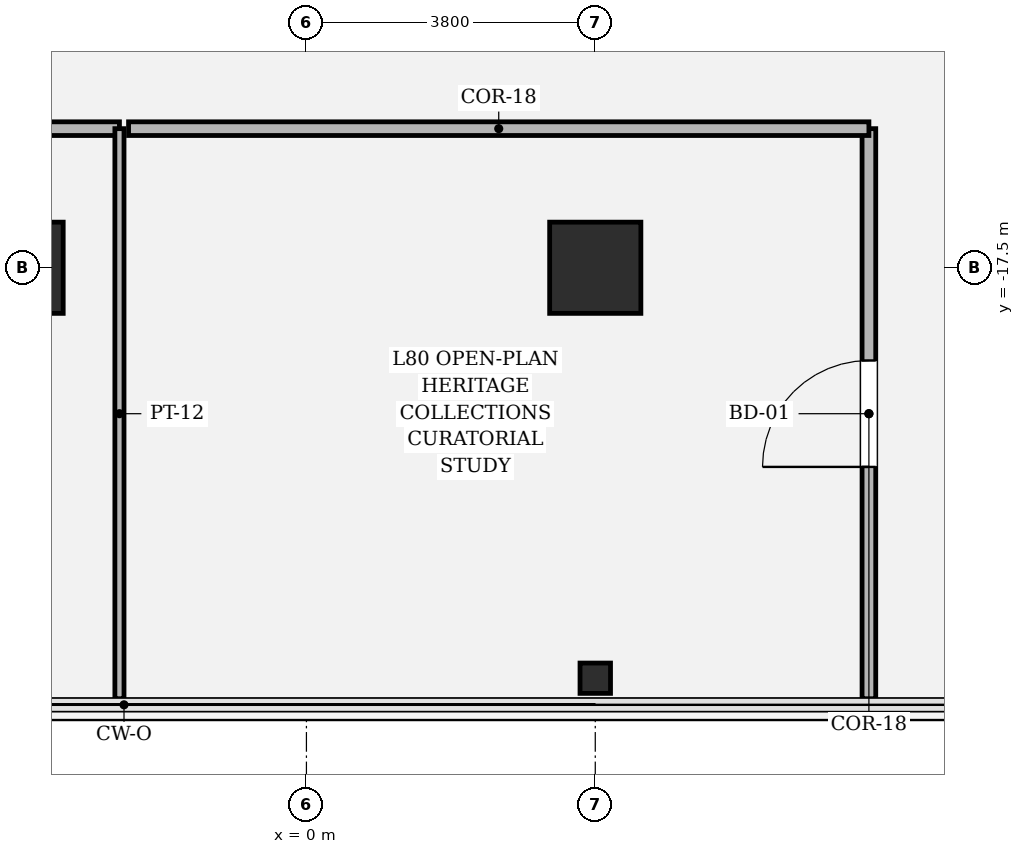
"""IFC4 building model, lengths in metres.
Left out: names, types, materials, properties, quantities, classifications, styles, units other than length and angle.
Written with IfcOpenShell. Run it as: python <this file> out.ifc"""

import sys

from ifc_helpers import new_model, si_unit, direction, frame, frame_2d, origin, origin_2d, place, context, subcontext, project, spatial, rectangle, hollow_rectangle, i_section, extrude, element, fill, save


model = new_model("IFC4")
c1 = context("Model", 3, precision=1e-05, world=origin(), true_north=direction((0.0, 1.0)))
c2 = subcontext(c1, "Body", "Model", "MODEL_VIEW")
j1 = project(units=[si_unit("LENGTHUNIT", "METRE"), si_unit("PLANEANGLEUNIT", "RADIAN")], contexts=[c1])
p1 = place(None, origin())
s1 = spatial("IfcSite", under=j1, at=p1, CompositionType="ELEMENT")
p2 = place(p1, origin())
s2 = spatial("IfcBuilding", under=s1, at=p2, CompositionType="ELEMENT")
p3 = place(p2, frame((0.0, 0.0, 339.0)))
s3 = spatial("IfcBuildingStorey", under=s2, at=p3, CompositionType="ELEMENT", Elevation=339.0)
for number, where, z_axis, x_axis in (
    (1, (-3.8, -17.5, 0.0), (0.0, 0.0, 1.0), (1.0, 0.0, 0.0)),
    (2, (3.8, -17.5, 0.0), (0.0, 0.0, 1.0), (1.0, 0.0, 0.0)),
):
    element("IfcColumn", number, at=place(p3, frame(where, z_axis=z_axis, x_axis=x_axis)), inside=s3, PredefinedType="COLUMN", context=c2, shape_type="SweptSolid", body=[
        extrude(hollow_rectangle(XDim=1.2, YDim=1.2, WallThickness=0.035, at=origin_2d()), origin(), (0.0, 0.0, 1.0), 4.8),
    ])
p4 = place(p3, frame((3.8, -22.9, 0.0), z_axis=(0.0, 0.0, 1.0), x_axis=(1.0, 0.0, 0.0)))
e3 = element("IfcColumn", 3, at=p4, inside=s3, PredefinedType="COLUMN", context=c2, shape_type="SweptSolid", body=[
    extrude(i_section(OverallWidth=0.401, OverallDepth=0.399, WebThickness=0.025, FlangeThickness=0.04, FilletRadius=0.018, at=origin_2d()), origin(), (0.0, 0.0, 1.0), 4.798),
])
p5 = place(p3, frame((-12.77, -15.67, 0.0), z_axis=(0.0, 0.0, 1.0), x_axis=(1.0, 0.0, 0.0)))
e4 = element("IfcWall", 4, at=p5, inside=s3, PredefinedType="PARTITIONING", context=c2, shape_type="SweptSolid", body=[
    extrude(rectangle(XDim=10.31, YDim=0.18, at=frame_2d((5.155, 0.0))), origin(), (0.0, 0.0, 1.0), 3.194),
])
p6 = place(p5, frame((4.405, 0.0, 0.0)))
e5 = element("IfcOpeningElement", 5, at=p6, cuts=e4, PredefinedType="OPENING", context=c2, shape_type="SweptSolid", body=[
    extrude(rectangle(XDim=1.5, YDim=2.3, at=frame_2d((0.75, 1.15))), frame((0.0, 0.1, 0.0), z_axis=(0.0, -1.0, 0.0), x_axis=(1.0, 0.0, 0.0)), (0.0, 0.0, 1.0), 0.2),
])
p7 = place(p3, frame((-2.46, -15.67, 0.0), z_axis=(0.0, 0.0, 1.0), x_axis=(0.0, -1.0, 0.0)))
e6 = element("IfcWall", 6, at=p7, inside=s3, PredefinedType="PARTITIONING", context=c2, shape_type="SweptSolid", body=[
    extrude(rectangle(XDim=7.5, YDim=0.12, at=frame_2d((3.75, 0.0))), origin(), (0.0, 0.0, 1.0), 3.194),
])
p8 = place(p3, frame((7.4, -15.67, 0.0), z_axis=(0.0, 0.0, 1.0), x_axis=(0.0, -1.0, 0.0)))
e7 = element("IfcWall", 7, at=p8, inside=s3, PredefinedType="PARTITIONING", context=c2, shape_type="SweptSolid", body=[
    extrude(rectangle(XDim=7.5, YDim=0.18, at=frame_2d((3.75, 0.0))), origin(), (0.0, 0.0, 1.0), 3.194),
])
p9 = place(p8, frame((3.05, 0.0, 0.0)))
e8 = element("IfcOpeningElement", 8, at=p9, cuts=e7, PredefinedType="OPENING", context=c2, shape_type="SweptSolid", body=[
    extrude(rectangle(XDim=1.4, YDim=2.25, at=frame_2d((0.7, 1.125))), frame((0.0, 0.1, 0.0), z_axis=(0.0, -1.0, 0.0), x_axis=(1.0, 0.0, 0.0)), (0.0, 0.0, 1.0), 0.2),
])
p10 = place(p3, frame((-2.34, -15.67, 0.0), z_axis=(0.0, 0.0, 1.0), x_axis=(1.0, 0.0, 0.0)))
e9 = element("IfcWall", 9, at=p10, inside=s3, PredefinedType="PARTITIONING", context=c2, shape_type="SweptSolid", body=[
    extrude(rectangle(XDim=9.74, YDim=0.18, at=frame_2d((4.87, 0.0))), origin(), (0.0, 0.0, 1.0), 3.194),
])
p11 = place(p9, origin())
e10 = element("IfcDoor", 10, at=p11, inside=s3, OperationType="SINGLE_SWING_RIGHT", PredefinedType="DOOR", context=c2, shape_type="SweptSolid", body=[
    extrude(rectangle(XDim=1.4, YDim=2.25, at=frame_2d((0.7, 1.125))), frame((0.0, 0.025, 0.0), z_axis=(0.0, -1.0, 0.0), x_axis=(1.0, 0.0, 0.0)), (0.0, 0.0, 1.0), 0.05),
])
fill(e8, e10)
save(model, sys.argv[1])
